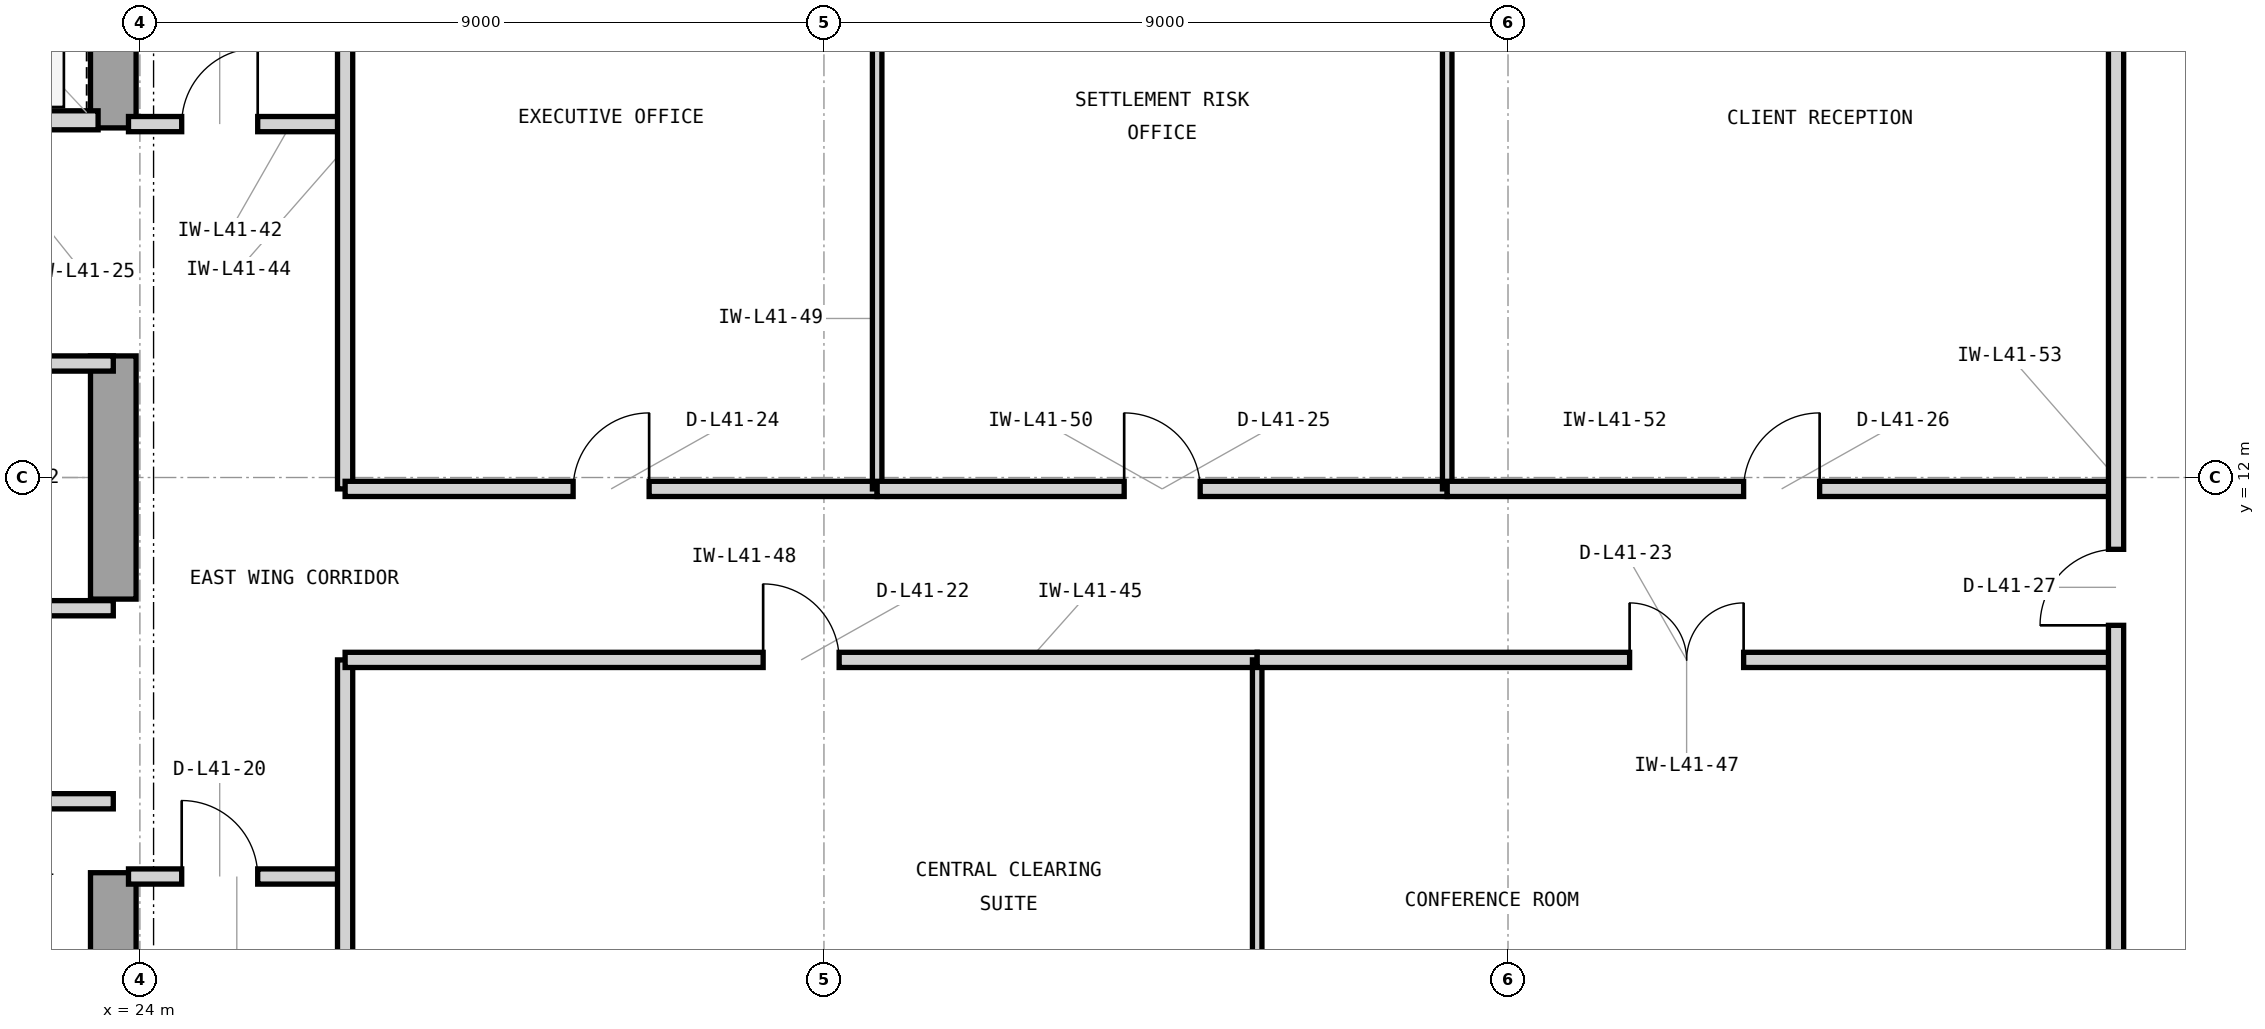
"""IFC4 building model, lengths in metres.
Left out: names, types, materials, properties, quantities, classifications, styles, units other than length and angle.
Written with IfcOpenShell. Run it as: python <this file> out.ifc"""

import sys

from ifc_helpers import new_model, si_unit, direction, frame, frame_2d, origin, place, context, subcontext, project, spatial, rectangle, extrude, element, fill, save


model = new_model("IFC4")
c1 = context("Model", 3, precision=1e-05, world=origin(), true_north=direction((0.0, 1.0)))
c2 = subcontext(c1, "Body", "Model", "MODEL_VIEW")
j1 = project(units=[si_unit("LENGTHUNIT", "METRE"), si_unit("PLANEANGLEUNIT", "RADIAN")], contexts=[c1])
p1 = place(None, origin())
s1 = spatial("IfcSite", under=j1, at=p1, CompositionType="ELEMENT")
p2 = place(p1, origin())
s2 = spatial("IfcBuilding", under=s1, at=p2, CompositionType="ELEMENT")
p3 = place(p2, frame((0.0, 0.0, 172.2)))
s3 = spatial("IfcBuildingStorey", under=s2, at=p3, CompositionType="ELEMENT", Elevation=172.2)
p4 = place(p3, frame((23.65, 3.65, 0.0), z_axis=(0.0, 0.0, 1.0), x_axis=(0.0, 1.0, 0.0)))
e1 = element("IfcWall", 1, at=p4, inside=s3, PredefinedType="SHEAR", context=c2, shape_type="SweptSolid", body=[
    extrude(rectangle(XDim=3.15, YDim=0.6, at=frame_2d((1.575, 0.0))), origin(), (0.0, 0.0, 1.0), 3.9),
])
p5 = place(p3, frame((23.65, 10.4, 0.0), z_axis=(0.0, 0.0, 1.0), x_axis=(0.0, 1.0, 0.0)))
e2 = element("IfcWall", 2, at=p5, inside=s3, PredefinedType="SHEAR", context=c2, shape_type="SweptSolid", body=[
    extrude(rectangle(XDim=3.2, YDim=0.6, at=frame_2d((1.6, 0.0))), origin(), (0.0, 0.0, 1.0), 3.9),
])
p6 = place(p3, frame((23.65, 16.6, 0.0), z_axis=(0.0, 0.0, 1.0), x_axis=(0.0, 1.0, 0.0)))
e3 = element("IfcWall", 3, at=p6, inside=s3, PredefinedType="SHEAR", context=c2, shape_type="SweptSolid", body=[
    extrude(rectangle(XDim=4.05, YDim=0.6, at=frame_2d((2.025, 0.0))), origin(), (0.0, 0.0, 1.0), 3.9),
])
p7 = place(p3, frame((21.05, 16.7, 0.0), z_axis=(0.0, 0.0, 1.0), x_axis=(1.0, 0.0, 0.0)))
e4 = element("IfcWall", 4, at=p7, inside=s3, PredefinedType="PARTITIONING", context=c2, shape_type="SweptSolid", body=[
    extrude(rectangle(XDim=2.4, YDim=0.25, at=frame_2d((1.2, 0.0))), origin(), (0.0, 0.0, 1.0), 3.283),
])
p8 = place(p7, frame((0.52, 0.0, 0.0)))
e5 = element("IfcOpeningElement", 5, at=p8, cuts=e4, PredefinedType="OPENING", context=c2, shape_type="SweptSolid", body=[
    extrude(rectangle(XDim=1.15, YDim=2.25, at=frame_2d((0.575, 1.125))), frame((0.0, 0.135, 0.0), z_axis=(0.0, -1.0, 0.0), x_axis=(1.0, 0.0, 0.0)), (0.0, 0.0, 1.0), 0.27),
])
p9 = place(p3, frame((20.65, 7.74, 0.0), z_axis=(0.0, 0.0, 1.0), x_axis=(1.0, 0.0, 0.0)))
e6 = element("IfcWall", 6, at=p9, inside=s3, PredefinedType="PARTITIONING", context=c2, shape_type="SweptSolid", body=[
    extrude(rectangle(XDim=3.0, YDim=0.2, at=frame_2d((1.5, 0.0))), origin(), (0.0, 0.0, 1.0), 3.69),
])
p10 = place(p9, frame((1.025, 0.0, 0.0)))
e7 = element("IfcOpeningElement", 7, at=p10, cuts=e6, PredefinedType="OPENING", context=c2, shape_type="SweptSolid", body=[
    extrude(rectangle(XDim=0.95, YDim=2.1, at=frame_2d((0.475, 1.05))), frame((0.0, 0.11, 0.0), z_axis=(0.0, -1.0, 0.0), x_axis=(1.0, 0.0, 0.0)), (0.0, 0.0, 1.0), 0.22),
])
p11 = place(p3, frame((14.825, 10.28, 0.0), z_axis=(0.0, 0.0, 1.0), x_axis=(1.0, 0.0, 0.0)))
e8 = element("IfcWall", 8, at=p11, inside=s3, PredefinedType="PARTITIONING", context=c2, shape_type="SweptSolid", body=[
    extrude(rectangle(XDim=8.825, YDim=0.2, at=frame_2d((4.413, 0.0))), origin(), (0.0, 0.0, 1.0), 3.69),
])
p12 = place(p3, frame((18.45, 13.5, 0.0), z_axis=(0.0, 0.0, 1.0), x_axis=(1.0, 0.0, 0.0)))
e9 = element("IfcWall", 9, at=p12, inside=s3, PredefinedType="PARTITIONING", context=c2, shape_type="SweptSolid", body=[
    extrude(rectangle(XDim=5.2, YDim=0.2, at=frame_2d((2.6, 0.0))), origin(), (0.0, 0.0, 1.0), 3.283),
])
p13 = place(p12, frame((2.125, 0.0, 0.0)))
e10 = element("IfcOpeningElement", 10, at=p13, cuts=e9, PredefinedType="OPENING", context=c2, shape_type="SweptSolid", body=[
    extrude(rectangle(XDim=0.95, YDim=2.1, at=frame_2d((0.475, 1.05))), frame((0.0, 0.11, 0.0), z_axis=(0.0, -1.0, 0.0), x_axis=(1.0, 0.0, 0.0)), (0.0, 0.0, 1.0), 0.22),
])
p14 = place(p3, frame((23.85, 6.75, 0.0), z_axis=(0.0, 0.0, 1.0), x_axis=(1.0, 0.0, 0.0)))
e11 = element("IfcWall", 11, at=p14, inside=s3, PredefinedType="PARTITIONING", context=c2, shape_type="SweptSolid", body=[
    extrude(rectangle(XDim=2.85, YDim=0.2, at=frame_2d((1.425, 0.0))), origin(), (0.0, 0.0, 1.0), 3.69),
])
p15 = place(p14, frame((0.7, 0.0, 0.0)))
e12 = element("IfcOpeningElement", 12, at=p15, cuts=e11, PredefinedType="OPENING", context=c2, shape_type="SweptSolid", body=[
    extrude(rectangle(XDim=1.0, YDim=2.15, at=frame_2d((0.5, 1.075))), frame((0.0, 0.11, 0.0), z_axis=(0.0, -1.0, 0.0), x_axis=(1.0, 0.0, 0.0)), (0.0, 0.0, 1.0), 0.22),
])
p16 = place(p3, frame((23.85, 16.65, 0.0), z_axis=(0.0, 0.0, 1.0), x_axis=(1.0, 0.0, 0.0)))
e13 = element("IfcWall", 13, at=p16, inside=s3, PredefinedType="PARTITIONING", context=c2, shape_type="SweptSolid", body=[
    extrude(rectangle(XDim=2.85, YDim=0.2, at=frame_2d((1.425, 0.0))), origin(), (0.0, 0.0, 1.0), 3.69),
])
p17 = place(p16, frame((0.7, 0.0, 0.0)))
e14 = element("IfcOpeningElement", 14, at=p17, cuts=e13, PredefinedType="OPENING", context=c2, shape_type="SweptSolid", body=[
    extrude(rectangle(XDim=1.0, YDim=2.15, at=frame_2d((0.5, 1.075))), frame((0.0, 0.11, 0.0), z_axis=(0.0, -1.0, 0.0), x_axis=(1.0, 0.0, 0.0)), (0.0, 0.0, 1.0), 0.22),
])
p18 = place(p3, frame((26.7, 3.18, 0.0), z_axis=(0.0, 0.0, 1.0), x_axis=(0.0, 1.0, 0.0)))
e15 = element("IfcWall", 15, at=p18, inside=s3, PredefinedType="PARTITIONING", context=c2, shape_type="SweptSolid", body=[
    extrude(rectangle(XDim=6.42, YDim=0.2, at=frame_2d((3.21, 0.0))), origin(), (0.0, 0.0, 1.0), 3.69),
])
p19 = place(p3, frame((26.7, 11.85, 0.0), z_axis=(0.0, 0.0, 1.0), x_axis=(0.0, 1.0, 0.0)))
e16 = element("IfcWall", 16, at=p19, inside=s3, PredefinedType="PARTITIONING", context=c2, shape_type="SweptSolid", body=[
    extrude(rectangle(XDim=8.97, YDim=0.2, at=frame_2d((4.485, 0.0))), origin(), (0.0, 0.0, 1.0), 3.69),
])
p20 = place(p3, frame((26.7, 9.6, 0.0), z_axis=(0.0, 0.0, 1.0), x_axis=(1.0, 0.0, 0.0)))
e17 = element("IfcWall", 17, at=p20, inside=s3, PredefinedType="PARTITIONING", context=c2, shape_type="SweptSolid", body=[
    extrude(rectangle(XDim=12.0, YDim=0.2, at=frame_2d((6.0, 0.0))), origin(), (0.0, 0.0, 1.0), 3.69),
])
p21 = place(p20, frame((5.5, 0.0, 0.0)))
e18 = element("IfcOpeningElement", 18, at=p21, cuts=e17, PredefinedType="OPENING", context=c2, shape_type="SweptSolid", body=[
    extrude(rectangle(XDim=1.0, YDim=2.15, at=frame_2d((0.5, 1.075))), frame((0.0, 0.11, 0.0), z_axis=(0.0, -1.0, 0.0), x_axis=(1.0, 0.0, 0.0)), (0.0, 0.0, 1.0), 0.22),
])
p22 = place(p3, frame((38.7, 3.18, 0.0), z_axis=(0.0, 0.0, 1.0), x_axis=(0.0, 1.0, 0.0)))
e19 = element("IfcWall", 19, at=p22, inside=s3, PredefinedType="PARTITIONING", context=c2, shape_type="SweptSolid", body=[
    extrude(rectangle(XDim=6.42, YDim=0.125, at=frame_2d((3.21, 0.0))), origin(), (0.0, 0.0, 1.0), 3.69),
])
p23 = place(p3, frame((38.7, 9.6, 0.0), z_axis=(0.0, 0.0, 1.0), x_axis=(1.0, 0.0, 0.0)))
e20 = element("IfcWall", 20, at=p23, inside=s3, PredefinedType="PARTITIONING", context=c2, shape_type="SweptSolid", body=[
    extrude(rectangle(XDim=11.3, YDim=0.2, at=frame_2d((5.65, 0.0))), origin(), (0.0, 0.0, 1.0), 3.69),
])
p24 = place(p23, frame((4.9, 0.0, 0.0)))
e21 = element("IfcOpeningElement", 21, at=p24, cuts=e20, PredefinedType="OPENING", context=c2, shape_type="SweptSolid", body=[
    extrude(rectangle(XDim=1.5, YDim=2.3, at=frame_2d((0.75, 1.15))), frame((0.0, 0.11, 0.0), z_axis=(0.0, -1.0, 0.0), x_axis=(1.0, 0.0, 0.0)), (0.0, 0.0, 1.0), 0.22),
])
p25 = place(p3, frame((26.7, 11.85, 0.0), z_axis=(0.0, 0.0, 1.0), x_axis=(1.0, 0.0, 0.0)))
e22 = element("IfcWall", 22, at=p25, inside=s3, PredefinedType="PARTITIONING", context=c2, shape_type="SweptSolid", body=[
    extrude(rectangle(XDim=7.0, YDim=0.2, at=frame_2d((3.5, 0.0))), origin(), (0.0, 0.0, 1.0), 3.69),
])
p26 = place(p25, frame((3.0, 0.0, 0.0)))
e23 = element("IfcOpeningElement", 23, at=p26, cuts=e22, PredefinedType="OPENING", context=c2, shape_type="SweptSolid", body=[
    extrude(rectangle(XDim=1.0, YDim=2.15, at=frame_2d((0.5, 1.075))), frame((0.0, 0.11, 0.0), z_axis=(0.0, -1.0, 0.0), x_axis=(1.0, 0.0, 0.0)), (0.0, 0.0, 1.0), 0.22),
])
p27 = place(p3, frame((33.7, 11.85, 0.0), z_axis=(0.0, 0.0, 1.0), x_axis=(0.0, 1.0, 0.0)))
e24 = element("IfcWall", 24, at=p27, inside=s3, PredefinedType="PARTITIONING", context=c2, shape_type="SweptSolid", body=[
    extrude(rectangle(XDim=8.97, YDim=0.125, at=frame_2d((4.485, 0.0))), origin(), (0.0, 0.0, 1.0), 3.69),
])
p28 = place(p3, frame((33.7, 11.85, 0.0), z_axis=(0.0, 0.0, 1.0), x_axis=(1.0, 0.0, 0.0)))
e25 = element("IfcWall", 25, at=p28, inside=s3, PredefinedType="PARTITIONING", context=c2, shape_type="SweptSolid", body=[
    extrude(rectangle(XDim=7.5, YDim=0.2, at=frame_2d((3.75, 0.0))), origin(), (0.0, 0.0, 1.0), 3.69),
])
p29 = place(p28, frame((3.25, 0.0, 0.0)))
e26 = element("IfcOpeningElement", 26, at=p29, cuts=e25, PredefinedType="OPENING", context=c2, shape_type="SweptSolid", body=[
    extrude(rectangle(XDim=1.0, YDim=2.15, at=frame_2d((0.5, 1.075))), frame((0.0, 0.11, 0.0), z_axis=(0.0, -1.0, 0.0), x_axis=(1.0, 0.0, 0.0)), (0.0, 0.0, 1.0), 0.22),
])
p30 = place(p3, frame((41.2, 11.85, 0.0), z_axis=(0.0, 0.0, 1.0), x_axis=(0.0, 1.0, 0.0)))
e27 = element("IfcWall", 27, at=p30, inside=s3, PredefinedType="PARTITIONING", context=c2, shape_type="SweptSolid", body=[
    extrude(rectangle(XDim=8.97, YDim=0.125, at=frame_2d((4.485, 0.0))), origin(), (0.0, 0.0, 1.0), 3.69),
])
p31 = place(p3, frame((41.2, 11.85, 0.0), z_axis=(0.0, 0.0, 1.0), x_axis=(1.0, 0.0, 0.0)))
e28 = element("IfcWall", 28, at=p31, inside=s3, PredefinedType="PARTITIONING", context=c2, shape_type="SweptSolid", body=[
    extrude(rectangle(XDim=8.8, YDim=0.2, at=frame_2d((4.4, 0.0))), origin(), (0.0, 0.0, 1.0), 3.69),
])
p32 = place(p31, frame((3.9, 0.0, 0.0)))
e29 = element("IfcOpeningElement", 29, at=p32, cuts=e28, PredefinedType="OPENING", context=c2, shape_type="SweptSolid", body=[
    extrude(rectangle(XDim=1.0, YDim=2.15, at=frame_2d((0.5, 1.075))), frame((0.0, 0.11, 0.0), z_axis=(0.0, -1.0, 0.0), x_axis=(1.0, 0.0, 0.0)), (0.0, 0.0, 1.0), 0.22),
])
p33 = place(p3, frame((50.0, 3.18, 0.0), z_axis=(0.0, 0.0, 1.0), x_axis=(0.0, 1.0, 0.0)))
e30 = element("IfcWall", 30, at=p33, inside=s3, PredefinedType="PARTITIONING", context=c2, shape_type="SweptSolid", body=[
    extrude(rectangle(XDim=17.64, YDim=0.2, at=frame_2d((8.82, 0.0))), origin(), (0.0, 0.0, 1.0), 3.69),
])
p34 = place(p33, frame((6.875, 0.0, 0.0)))
e31 = element("IfcOpeningElement", 31, at=p34, cuts=e30, PredefinedType="OPENING", context=c2, shape_type="SweptSolid", body=[
    extrude(rectangle(XDim=1.0, YDim=2.15, at=frame_2d((0.5, 1.075))), frame((0.0, 0.11, 0.0), z_axis=(0.0, -1.0, 0.0), x_axis=(1.0, 0.0, 0.0)), (0.0, 0.0, 1.0), 0.22),
])
p35 = place(p15, origin())
e32 = element("IfcDoor", 32, at=p35, inside=s3, OperationType="SINGLE_SWING_LEFT", PredefinedType="DOOR", context=c2, shape_type="SweptSolid", body=[
    extrude(rectangle(XDim=1.0, YDim=2.15, at=frame_2d((0.5, 1.075))), frame((0.0, 0.025, 0.0), z_axis=(0.0, -1.0, 0.0), x_axis=(1.0, 0.0, 0.0)), (0.0, 0.0, 1.0), 0.05),
])
fill(e12, e32)
p36 = place(p17, origin())
e33 = element("IfcDoor", 33, at=p36, inside=s3, OperationType="SINGLE_SWING_RIGHT", PredefinedType="DOOR", context=c2, shape_type="SweptSolid", body=[
    extrude(rectangle(XDim=1.0, YDim=2.15, at=frame_2d((0.5, 1.075))), frame((0.0, 0.025, 0.0), z_axis=(0.0, -1.0, 0.0), x_axis=(1.0, 0.0, 0.0)), (0.0, 0.0, 1.0), 0.05),
])
fill(e14, e33)
p37 = place(p21, origin())
e34 = element("IfcDoor", 34, at=p37, inside=s3, OperationType="SINGLE_SWING_LEFT", PredefinedType="DOOR", context=c2, shape_type="SweptSolid", body=[
    extrude(rectangle(XDim=1.0, YDim=2.15, at=frame_2d((0.5, 1.075))), frame((0.0, 0.025, 0.0), z_axis=(0.0, -1.0, 0.0), x_axis=(1.0, 0.0, 0.0)), (0.0, 0.0, 1.0), 0.05),
])
fill(e18, e34)
p38 = place(p24, origin())
e35 = element("IfcDoor", 35, at=p38, inside=s3, OperationType="DOUBLE_DOOR_SINGLE_SWING", PredefinedType="DOOR", context=c2, shape_type="SweptSolid", body=[
    extrude(rectangle(XDim=1.5, YDim=2.3, at=frame_2d((0.75, 1.15))), frame((0.0, 0.025, 0.0), z_axis=(0.0, -1.0, 0.0), x_axis=(1.0, 0.0, 0.0)), (0.0, 0.0, 1.0), 0.05),
])
fill(e21, e35)
p39 = place(p26, origin())
e36 = element("IfcDoor", 36, at=p39, inside=s3, OperationType="SINGLE_SWING_RIGHT", PredefinedType="DOOR", context=c2, shape_type="SweptSolid", body=[
    extrude(rectangle(XDim=1.0, YDim=2.15, at=frame_2d((0.5, 1.075))), frame((0.0, 0.025, 0.0), z_axis=(0.0, -1.0, 0.0), x_axis=(1.0, 0.0, 0.0)), (0.0, 0.0, 1.0), 0.05),
])
fill(e23, e36)
p40 = place(p29, origin())
e37 = element("IfcDoor", 37, at=p40, inside=s3, OperationType="SINGLE_SWING_LEFT", PredefinedType="DOOR", context=c2, shape_type="SweptSolid", body=[
    extrude(rectangle(XDim=1.0, YDim=2.15, at=frame_2d((0.5, 1.075))), frame((0.0, 0.025, 0.0), z_axis=(0.0, -1.0, 0.0), x_axis=(1.0, 0.0, 0.0)), (0.0, 0.0, 1.0), 0.05),
])
fill(e26, e37)
p41 = place(p32, origin())
e38 = element("IfcDoor", 38, at=p41, inside=s3, OperationType="SINGLE_SWING_RIGHT", PredefinedType="DOOR", context=c2, shape_type="SweptSolid", body=[
    extrude(rectangle(XDim=1.0, YDim=2.15, at=frame_2d((0.5, 1.075))), frame((0.0, 0.025, 0.0), z_axis=(0.0, -1.0, 0.0), x_axis=(1.0, 0.0, 0.0)), (0.0, 0.0, 1.0), 0.05),
])
fill(e29, e38)
p42 = place(p34, origin())
e39 = element("IfcDoor", 39, at=p42, inside=s3, OperationType="SINGLE_SWING_LEFT", PredefinedType="DOOR", context=c2, shape_type="SweptSolid", body=[
    extrude(rectangle(XDim=1.0, YDim=2.15, at=frame_2d((0.5, 1.075))), frame((0.0, 0.025, 0.0), z_axis=(0.0, -1.0, 0.0), x_axis=(1.0, 0.0, 0.0)), (0.0, 0.0, 1.0), 0.05),
])
fill(e31, e39)
save(model, sys.argv[1])
